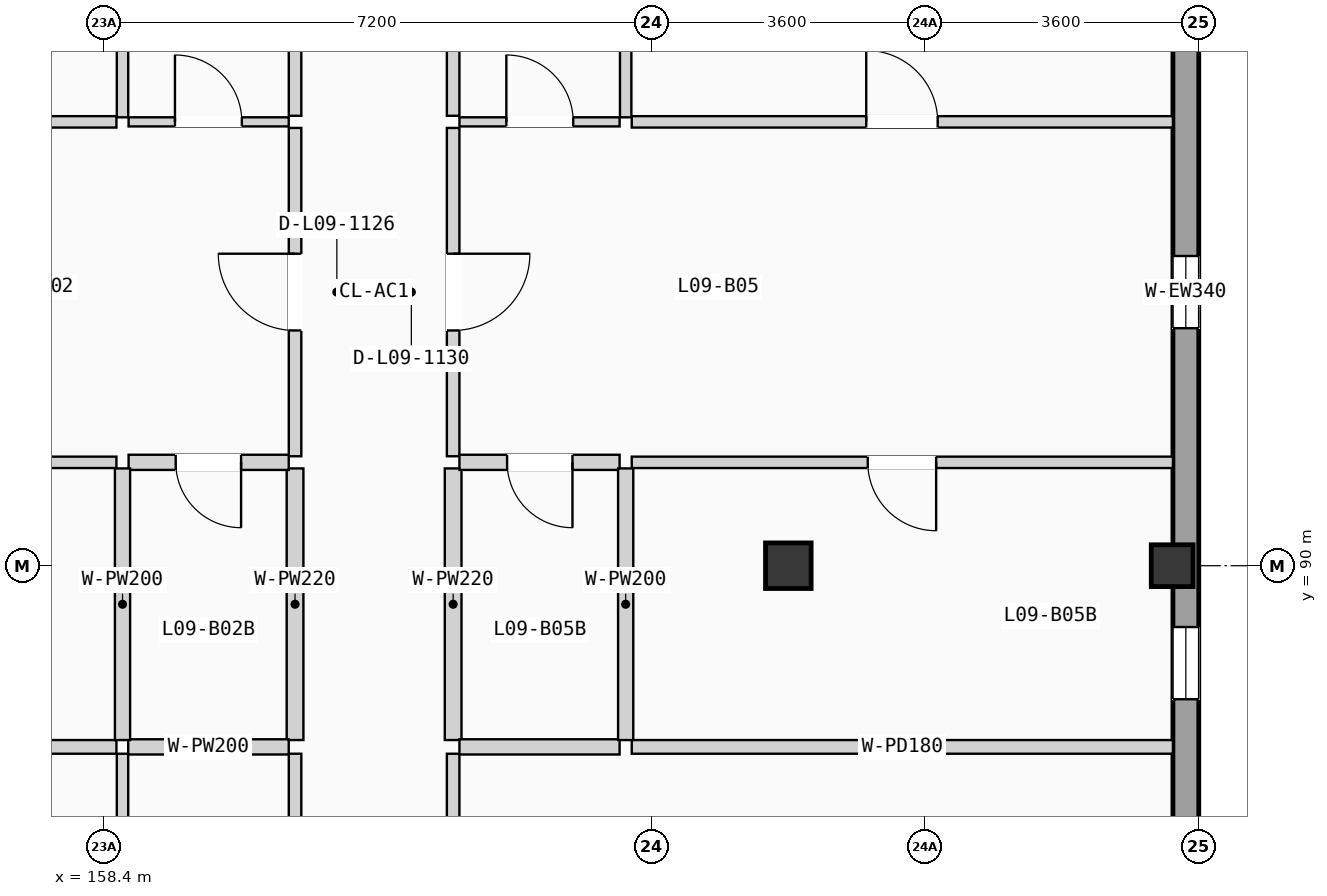
"""IFC4 building model, lengths in metres.
Left out: names, types, materials, properties, quantities, classifications, styles, units other than length and angle.
Written with IfcOpenShell. Run it as: python <this file> out.ifc"""

import sys

from ifc_helpers import new_model, si_unit, direction, frame, frame_2d, origin, origin_2d, place, context, subcontext, project, spatial, rectangle, extrude, element, fill, save


model = new_model("IFC4")
c1 = context("Model", 3, precision=1e-05, world=origin(), true_north=direction((0.0, 1.0)))
c2 = subcontext(c1, "Body", "Model", "MODEL_VIEW")
j1 = project(units=[si_unit("LENGTHUNIT", "METRE"), si_unit("PLANEANGLEUNIT", "RADIAN")], contexts=[c1])
p1 = place(None, origin())
s1 = spatial("IfcSite", under=j1, at=p1, CompositionType="ELEMENT")
p2 = place(p1, origin())
s2 = spatial("IfcBuilding", under=s1, at=p2, CompositionType="ELEMENT")
p3 = place(p2, frame((0.0, 0.0, 30.975)))
s3 = spatial("IfcBuildingStorey", under=s2, at=p3, CompositionType="ELEMENT", Elevation=30.975)
p4 = place(p3, frame((167.4, 90.0, 0.0), z_axis=(0.0, 0.0, 1.0), x_axis=(1.0, 0.0, 0.0)))
e1 = element("IfcColumn", 1, at=p4, inside=s3, PredefinedType="COLUMN", context=c2, shape_type="SweptSolid", body=[
    extrude(rectangle(XDim=0.6, YDim=0.6, at=origin_2d()), origin(), (0.0, 0.0, 1.0), 3.15),
])
p5 = place(p3, frame((172.45, 90.0, 0.0), z_axis=(0.0, 0.0, 1.0), x_axis=(1.0, 0.0, 0.0)))
e2 = element("IfcColumn", 2, at=p5, inside=s3, PredefinedType="COLUMN", context=c2, shape_type="SweptSolid", body=[
    extrude(rectangle(XDim=0.55, YDim=0.55, at=origin_2d()), origin(), (0.0, 0.0, 1.0), 3.15),
])
p6 = place(p3, frame((172.63, 68.74, 0.0), z_axis=(0.0, 0.0, 1.0), x_axis=(0.0, 1.0, 0.0)))
e3 = element("IfcWall", 3, at=p6, inside=s3, PredefinedType="SOLIDWALL", context=c2, shape_type="SweptSolid", body=[
    extrude(rectangle(XDim=49.72, YDim=0.34, at=frame_2d((24.86, 0.0))), origin(), (0.0, 0.0, 1.0), 2.9),
])
p7 = place(p6, frame((9.297, 0.0, 0.715)))
e4 = element("IfcOpeningElement", 4, at=p7, cuts=e3, PredefinedType="OPENING", context=c2, shape_type="SweptSolid", body=[
    extrude(rectangle(XDim=1.6, YDim=1.5, at=frame_2d((0.8, 0.75))), frame((0.0, 0.18, 0.0), z_axis=(0.0, -1.0, 0.0), x_axis=(1.0, 0.0, 0.0)), (0.0, 0.0, 1.0), 0.36),
])
p8 = place(p6, frame((15.758, 0.0, 0.565)))
e5 = element("IfcOpeningElement", 5, at=p8, cuts=e3, PredefinedType="OPENING", context=c2, shape_type="SweptSolid", body=[
    extrude(rectangle(XDim=1.6, YDim=1.65, at=frame_2d((0.8, 0.825))), frame((0.0, 0.18, 0.0), z_axis=(0.0, -1.0, 0.0), x_axis=(1.0, 0.0, 0.0)), (0.0, 0.0, 1.0), 0.36),
])
p9 = place(p6, frame((24.385, 0.0, 0.85)))
e6 = element("IfcOpeningElement", 6, at=p9, cuts=e3, PredefinedType="OPENING", context=c2, shape_type="SweptSolid", body=[
    extrude(rectangle(XDim=0.95, YDim=1.2, at=frame_2d((0.475, 0.6))), frame((0.0, 0.18, 0.0), z_axis=(0.0, -1.0, 0.0), x_axis=(1.0, 0.0, 0.0)), (0.0, 0.0, 1.0), 0.36),
])
p10 = place(p6, frame((19.503, 0.0, 0.85)))
e7 = element("IfcOpeningElement", 7, at=p10, cuts=e3, PredefinedType="OPENING", context=c2, shape_type="SweptSolid", body=[
    extrude(rectangle(XDim=0.95, YDim=1.2, at=frame_2d((0.475, 0.6))), frame((0.0, 0.18, 0.0), z_axis=(0.0, -1.0, 0.0), x_axis=(1.0, 0.0, 0.0)), (0.0, 0.0, 1.0), 0.36),
])
p11 = place(p6, frame((29.267, 0.0, 0.85)))
e8 = element("IfcOpeningElement", 8, at=p11, cuts=e3, PredefinedType="OPENING", context=c2, shape_type="SweptSolid", body=[
    extrude(rectangle(XDim=0.95, YDim=1.2, at=frame_2d((0.475, 0.6))), frame((0.0, 0.18, 0.0), z_axis=(0.0, -1.0, 0.0), x_axis=(1.0, 0.0, 0.0)), (0.0, 0.0, 1.0), 0.36),
])
p12 = place(p6, frame((36.508, 0.0, 0.715)))
e9 = element("IfcOpeningElement", 9, at=p12, cuts=e3, PredefinedType="OPENING", context=c2, shape_type="SweptSolid", body=[
    extrude(rectangle(XDim=1.72, YDim=1.5, at=frame_2d((0.86, 0.75))), frame((0.0, 0.18, 0.0), z_axis=(0.0, -1.0, 0.0), x_axis=(1.0, 0.0, 0.0)), (0.0, 0.0, 1.0), 0.36),
])
p13 = place(p6, frame((31.821, 0.0, 0.565)))
e10 = element("IfcOpeningElement", 10, at=p13, cuts=e3, PredefinedType="OPENING", context=c2, shape_type="SweptSolid", body=[
    extrude(rectangle(XDim=1.72, YDim=1.65, at=frame_2d((0.86, 0.825))), frame((0.0, 0.18, 0.0), z_axis=(0.0, -1.0, 0.0), x_axis=(1.0, 0.0, 0.0)), (0.0, 0.0, 1.0), 0.36),
])
p14 = place(p6, frame((40.239, 0.0, 0.85)))
e11 = element("IfcOpeningElement", 11, at=p14, cuts=e3, PredefinedType="OPENING", context=c2, shape_type="SweptSolid", body=[
    extrude(rectangle(XDim=0.95, YDim=1.2, at=frame_2d((0.475, 0.6))), frame((0.0, 0.18, 0.0), z_axis=(0.0, -1.0, 0.0), x_axis=(1.0, 0.0, 0.0)), (0.0, 0.0, 1.0), 0.36),
])
p15 = place(p3, frame((160.91, 84.033, 0.0), z_axis=(0.0, 0.0, 1.0), x_axis=(0.0, 1.0, 0.0)))
e12 = element("IfcWall", 12, at=p15, inside=s3, PredefinedType="PARTITIONING", context=c2, shape_type="SweptSolid", body=[
    extrude(rectangle(XDim=3.493, YDim=0.165, at=frame_2d((1.747, 0.0))), origin(), (0.0, 0.0, 1.0), 2.87),
])
p16 = place(p3, frame((160.91, 91.44, 0.0), z_axis=(0.0, 0.0, 1.0), x_axis=(0.0, 1.0, 0.0)))
e13 = element("IfcWall", 13, at=p16, inside=s3, PredefinedType="PARTITIONING", context=c2, shape_type="SweptSolid", body=[
    extrude(rectangle(XDim=4.32, YDim=0.165, at=frame_2d((2.16, 0.0))), origin(), (0.0, 0.0, 1.0), 2.87),
])
p17 = place(p16, frame((1.655, 0.0, 0.0)))
e14 = element("IfcOpeningElement", 14, at=p17, cuts=e13, PredefinedType="OPENING", context=c2, shape_type="SweptSolid", body=[
    extrude(rectangle(XDim=1.01, YDim=2.11, at=frame_2d((0.505, 1.055))), frame((0.0, 0.093, 0.0), z_axis=(0.0, -1.0, 0.0), x_axis=(1.0, 0.0, 0.0)), (0.0, 0.0, 1.0), 0.185),
])
p18 = place(p3, frame((160.91, 87.706, 0.0), z_axis=(0.0, 0.0, 1.0), x_axis=(0.0, 1.0, 0.0)))
e15 = element("IfcWall", 15, at=p18, inside=s3, PredefinedType="PLUMBINGWALL", context=c2, shape_type="SweptSolid", body=[
    extrude(rectangle(XDim=3.574, YDim=0.22, at=frame_2d((1.787, 0.0))), origin(), (0.0, 0.0, 1.0), 2.87),
])
p19 = place(p3, frame((160.91, 95.92, 0.0), z_axis=(0.0, 0.0, 1.0), x_axis=(0.0, 1.0, 0.0)))
e16 = element("IfcWall", 16, at=p19, inside=s3, PredefinedType="PARTITIONING", context=c2, shape_type="SweptSolid", body=[
    extrude(rectangle(XDim=3.574, YDim=0.165, at=frame_2d((1.787, 0.0))), origin(), (0.0, 0.0, 1.0), 2.87),
])
p20 = place(p3, frame((162.99, 81.853, 0.0), z_axis=(0.0, 0.0, 1.0), x_axis=(0.0, 1.0, 0.0)))
e17 = element("IfcWall", 17, at=p20, inside=s3, PredefinedType="PARTITIONING", context=c2, shape_type="SweptSolid", body=[
    extrude(rectangle(XDim=5.673, YDim=0.165, at=frame_2d((2.836, 0.0))), origin(), (0.0, 0.0, 1.0), 2.87),
])
p21 = place(p20, frame((2.347, 0.0, 0.0)))
e18 = element("IfcOpeningElement", 18, at=p21, cuts=e17, PredefinedType="OPENING", context=c2, shape_type="SweptSolid", body=[
    extrude(rectangle(XDim=0.98, YDim=2.08, at=frame_2d((0.49, 1.04))), frame((0.0, 0.093, 0.0), z_axis=(0.0, -1.0, 0.0), x_axis=(1.0, 0.0, 0.0)), (0.0, 0.0, 1.0), 0.185),
])
p22 = place(p3, frame((162.99, 91.44, 0.0), z_axis=(0.0, 0.0, 1.0), x_axis=(0.0, 1.0, 0.0)))
e19 = element("IfcWall", 19, at=p22, inside=s3, PredefinedType="PARTITIONING", context=c2, shape_type="SweptSolid", body=[
    extrude(rectangle(XDim=4.32, YDim=0.165, at=frame_2d((2.16, 0.0))), origin(), (0.0, 0.0, 1.0), 2.87),
])
p23 = place(p22, frame((1.655, 0.0, 0.0)))
e20 = element("IfcOpeningElement", 20, at=p23, cuts=e19, PredefinedType="OPENING", context=c2, shape_type="SweptSolid", body=[
    extrude(rectangle(XDim=1.01, YDim=2.11, at=frame_2d((0.505, 1.055))), frame((0.0, 0.093, 0.0), z_axis=(0.0, -1.0, 0.0), x_axis=(1.0, 0.0, 0.0)), (0.0, 0.0, 1.0), 0.185),
])
p24 = place(p3, frame((162.99, 87.706, 0.0), z_axis=(0.0, 0.0, 1.0), x_axis=(0.0, 1.0, 0.0)))
e21 = element("IfcWall", 21, at=p24, inside=s3, PredefinedType="PLUMBINGWALL", context=c2, shape_type="SweptSolid", body=[
    extrude(rectangle(XDim=3.574, YDim=0.22, at=frame_2d((1.787, 0.0))), origin(), (0.0, 0.0, 1.0), 2.87),
])
p25 = place(p3, frame((162.99, 95.92, 0.0), z_axis=(0.0, 0.0, 1.0), x_axis=(0.0, 1.0, 0.0)))
e22 = element("IfcWall", 22, at=p25, inside=s3, PredefinedType="PARTITIONING", context=c2, shape_type="SweptSolid", body=[
    extrude(rectangle(XDim=3.574, YDim=0.165, at=frame_2d((1.787, 0.0))), origin(), (0.0, 0.0, 1.0), 2.87),
])
p26 = place(p3, frame((158.64, 84.013, 0.0), z_axis=(0.0, 0.0, 1.0), x_axis=(0.0, 1.0, 0.0)))
e23 = element("IfcWall", 23, at=p26, inside=s3, PredefinedType="PARTITIONING", context=c2, shape_type="SweptSolid", body=[
    extrude(rectangle(XDim=3.513, YDim=0.15, at=frame_2d((1.756, 0.0))), origin(), (0.0, 0.0, 1.0), 2.87),
])
p27 = place(p3, frame((158.715, 87.616, 0.0), z_axis=(0.0, 0.0, 1.0), x_axis=(1.0, 0.0, 0.0)))
e24 = element("IfcWall", 24, at=p27, inside=s3, PredefinedType="PLUMBINGWALL", context=c2, shape_type="SweptSolid", body=[
    extrude(rectangle(XDim=2.112, YDim=0.2, at=frame_2d((1.056, 0.0))), origin(), (0.0, 0.0, 1.0), 2.87),
])
p28 = place(p3, frame((151.54, 87.616, 0.0), z_axis=(0.0, 0.0, 1.0), x_axis=(1.0, 0.0, 0.0)))
e25 = element("IfcWall", 25, at=p28, inside=s3, PredefinedType="PARTITIONING", context=c2, shape_type="SweptSolid", body=[
    extrude(rectangle(XDim=7.02, YDim=0.18, at=frame_2d((3.51, 0.0))), origin(), (0.0, 0.0, 1.0), 2.87),
])
p29 = place(p3, frame((158.72, 91.36, 0.0), z_axis=(0.0, 0.0, 1.0), x_axis=(1.0, 0.0, 0.0)))
e26 = element("IfcWall", 26, at=p29, inside=s3, PredefinedType="PLUMBINGWALL", context=c2, shape_type="SweptSolid", body=[
    extrude(rectangle(XDim=2.107, YDim=0.2, at=frame_2d((1.053, 0.0))), origin(), (0.0, 0.0, 1.0), 2.87),
])
p30 = place(p29, frame((0.62, 0.0, 0.0)))
e27 = element("IfcOpeningElement", 27, at=p30, cuts=e26, PredefinedType="OPENING", context=c2, shape_type="SweptSolid", body=[
    extrude(rectangle(XDim=0.86, YDim=2.0, at=frame_2d((0.43, 1.0))), frame((0.0, 0.11, 0.0), z_axis=(0.0, -1.0, 0.0), x_axis=(1.0, 0.0, 0.0)), (0.0, 0.0, 1.0), 0.22),
])
p31 = place(p3, frame((158.72, 95.84, 0.0), z_axis=(0.0, 0.0, 1.0), x_axis=(1.0, 0.0, 0.0)))
e28 = element("IfcWall", 28, at=p31, inside=s3, PredefinedType="PARTITIONING", context=c2, shape_type="SweptSolid", body=[
    extrude(rectangle(XDim=2.107, YDim=0.12, at=frame_2d((1.053, 0.0))), origin(), (0.0, 0.0, 1.0), 2.87),
])
p32 = place(p31, frame((0.61, 0.0, 0.0)))
e29 = element("IfcOpeningElement", 29, at=p32, cuts=e28, PredefinedType="OPENING", context=c2, shape_type="SweptSolid", body=[
    extrude(rectangle(XDim=0.88, YDim=2.02, at=frame_2d((0.44, 1.01))), frame((0.0, 0.07, 0.0), z_axis=(0.0, -1.0, 0.0), x_axis=(1.0, 0.0, 0.0)), (0.0, 0.0, 1.0), 0.14),
])
p33 = place(p3, frame((151.54, 91.36, 0.0), z_axis=(0.0, 0.0, 1.0), x_axis=(1.0, 0.0, 0.0)))
e30 = element("IfcWall", 30, at=p33, inside=s3, PredefinedType="PARTITIONING", context=c2, shape_type="SweptSolid", body=[
    extrude(rectangle(XDim=7.02, YDim=0.15, at=frame_2d((3.51, 0.0))), origin(), (0.0, 0.0, 1.0), 2.87),
])
p34 = place(p33, frame((3.045, 0.0, 0.0)))
e31 = element("IfcOpeningElement", 31, at=p34, cuts=e30, PredefinedType="OPENING", context=c2, shape_type="SweptSolid", body=[
    extrude(rectangle(XDim=0.94, YDim=2.06, at=frame_2d((0.47, 1.03))), frame((0.0, 0.085, 0.0), z_axis=(0.0, -1.0, 0.0), x_axis=(1.0, 0.0, 0.0)), (0.0, 0.0, 1.0), 0.17),
])
p35 = place(p3, frame((151.54, 95.84, 0.0), z_axis=(0.0, 0.0, 1.0), x_axis=(1.0, 0.0, 0.0)))
e32 = element("IfcWall", 32, at=p35, inside=s3, PredefinedType="PARTITIONING", context=c2, shape_type="SweptSolid", body=[
    extrude(rectangle(XDim=7.02, YDim=0.15, at=frame_2d((3.51, 0.0))), origin(), (0.0, 0.0, 1.0), 2.87),
])
p36 = place(p35, frame((3.015, 0.0, 0.0)))
e33 = element("IfcOpeningElement", 33, at=p36, cuts=e32, PredefinedType="OPENING", context=c2, shape_type="SweptSolid", body=[
    extrude(rectangle(XDim=1.0, YDim=2.06, at=frame_2d((0.5, 1.03))), frame((0.0, 0.085, 0.0), z_axis=(0.0, -1.0, 0.0), x_axis=(1.0, 0.0, 0.0)), (0.0, 0.0, 1.0), 0.17),
])
p37 = place(p3, frame((158.64, 87.706, 0.0), z_axis=(0.0, 0.0, 1.0), x_axis=(0.0, 1.0, 0.0)))
e34 = element("IfcWall", 34, at=p37, inside=s3, PredefinedType="PLUMBINGWALL", context=c2, shape_type="SweptSolid", body=[
    extrude(rectangle(XDim=3.574, YDim=0.2, at=frame_2d((1.787, 0.0))), origin(), (0.0, 0.0, 1.0), 2.87),
])
p38 = place(p3, frame((158.64, 95.9, 0.0), z_axis=(0.0, 0.0, 1.0), x_axis=(0.0, 1.0, 0.0)))
e35 = element("IfcWall", 35, at=p38, inside=s3, PredefinedType="PARTITIONING", context=c2, shape_type="SweptSolid", body=[
    extrude(rectangle(XDim=3.594, YDim=0.15, at=frame_2d((1.797, 0.0))), origin(), (0.0, 0.0, 1.0), 2.87),
])
p39 = place(p3, frame((163.073, 87.616, 0.0), z_axis=(0.0, 0.0, 1.0), x_axis=(1.0, 0.0, 0.0)))
e36 = element("IfcWall", 36, at=p39, inside=s3, PredefinedType="PLUMBINGWALL", context=c2, shape_type="SweptSolid", body=[
    extrude(rectangle(XDim=2.107, YDim=0.2, at=frame_2d((1.053, 0.0))), origin(), (0.0, 0.0, 1.0), 2.87),
])
p40 = place(p3, frame((165.34, 87.616, 0.0), z_axis=(0.0, 0.0, 1.0), x_axis=(1.0, 0.0, 0.0)))
e37 = element("IfcWall", 37, at=p40, inside=s3, PredefinedType="PARTITIONING", context=c2, shape_type="SweptSolid", body=[
    extrude(rectangle(XDim=7.12, YDim=0.18, at=frame_2d((3.56, 0.0))), origin(), (0.0, 0.0, 1.0), 2.87),
])
p41 = place(p3, frame((163.073, 91.36, 0.0), z_axis=(0.0, 0.0, 1.0), x_axis=(1.0, 0.0, 0.0)))
e38 = element("IfcWall", 38, at=p41, inside=s3, PredefinedType="PLUMBINGWALL", context=c2, shape_type="SweptSolid", body=[
    extrude(rectangle(XDim=2.107, YDim=0.2, at=frame_2d((1.053, 0.0))), origin(), (0.0, 0.0, 1.0), 2.87),
])
p42 = place(p41, frame((0.627, 0.0, 0.0)))
e39 = element("IfcOpeningElement", 39, at=p42, cuts=e38, PredefinedType="OPENING", context=c2, shape_type="SweptSolid", body=[
    extrude(rectangle(XDim=0.86, YDim=2.0, at=frame_2d((0.43, 1.0))), frame((0.0, 0.11, 0.0), z_axis=(0.0, -1.0, 0.0), x_axis=(1.0, 0.0, 0.0)), (0.0, 0.0, 1.0), 0.22),
])
p43 = place(p3, frame((163.073, 95.84, 0.0), z_axis=(0.0, 0.0, 1.0), x_axis=(1.0, 0.0, 0.0)))
e40 = element("IfcWall", 40, at=p43, inside=s3, PredefinedType="PARTITIONING", context=c2, shape_type="SweptSolid", body=[
    extrude(rectangle(XDim=2.107, YDim=0.12, at=frame_2d((1.053, 0.0))), origin(), (0.0, 0.0, 1.0), 2.87),
])
p44 = place(p43, frame((0.617, 0.0, 0.0)))
e41 = element("IfcOpeningElement", 41, at=p44, cuts=e40, PredefinedType="OPENING", context=c2, shape_type="SweptSolid", body=[
    extrude(rectangle(XDim=0.88, YDim=2.02, at=frame_2d((0.44, 1.01))), frame((0.0, 0.07, 0.0), z_axis=(0.0, -1.0, 0.0), x_axis=(1.0, 0.0, 0.0)), (0.0, 0.0, 1.0), 0.14),
])
p45 = place(p3, frame((165.34, 91.36, 0.0), z_axis=(0.0, 0.0, 1.0), x_axis=(1.0, 0.0, 0.0)))
e42 = element("IfcWall", 42, at=p45, inside=s3, PredefinedType="PARTITIONING", context=c2, shape_type="SweptSolid", body=[
    extrude(rectangle(XDim=7.12, YDim=0.15, at=frame_2d((3.56, 0.0))), origin(), (0.0, 0.0, 1.0), 2.87),
])
p46 = place(p45, frame((3.105, 0.0, 0.0)))
e43 = element("IfcOpeningElement", 43, at=p46, cuts=e42, PredefinedType="OPENING", context=c2, shape_type="SweptSolid", body=[
    extrude(rectangle(XDim=0.9, YDim=2.04, at=frame_2d((0.45, 1.02))), frame((0.0, 0.085, 0.0), z_axis=(0.0, -1.0, 0.0), x_axis=(1.0, 0.0, 0.0)), (0.0, 0.0, 1.0), 0.17),
])
p47 = place(p3, frame((165.34, 95.84, 0.0), z_axis=(0.0, 0.0, 1.0), x_axis=(1.0, 0.0, 0.0)))
e44 = element("IfcWall", 44, at=p47, inside=s3, PredefinedType="PARTITIONING", context=c2, shape_type="SweptSolid", body=[
    extrude(rectangle(XDim=7.12, YDim=0.15, at=frame_2d((3.56, 0.0))), origin(), (0.0, 0.0, 1.0), 2.87),
])
p48 = place(p47, frame((3.085, 0.0, 0.0)))
e45 = element("IfcOpeningElement", 45, at=p48, cuts=e44, PredefinedType="OPENING", context=c2, shape_type="SweptSolid", body=[
    extrude(rectangle(XDim=0.94, YDim=2.06, at=frame_2d((0.47, 1.03))), frame((0.0, 0.085, 0.0), z_axis=(0.0, -1.0, 0.0), x_axis=(1.0, 0.0, 0.0)), (0.0, 0.0, 1.0), 0.17),
])
p49 = place(p3, frame((165.26, 87.706, 0.0), z_axis=(0.0, 0.0, 1.0), x_axis=(0.0, 1.0, 0.0)))
e46 = element("IfcWall", 46, at=p49, inside=s3, PredefinedType="PLUMBINGWALL", context=c2, shape_type="SweptSolid", body=[
    extrude(rectangle(XDim=3.574, YDim=0.2, at=frame_2d((1.787, 0.0))), origin(), (0.0, 0.0, 1.0), 2.87),
])
p50 = place(p3, frame((165.26, 95.9, 0.0), z_axis=(0.0, 0.0, 1.0), x_axis=(0.0, 1.0, 0.0)))
e47 = element("IfcWall", 47, at=p50, inside=s3, PredefinedType="PARTITIONING", context=c2, shape_type="SweptSolid", body=[
    extrude(rectangle(XDim=3.594, YDim=0.15, at=frame_2d((1.797, 0.0))), origin(), (0.0, 0.0, 1.0), 2.87),
])
p51 = place(p9, origin())
e48 = element("IfcWindow", 48, at=p51, inside=s3, PartitioningType="SINGLE_PANEL", PredefinedType="WINDOW", context=c2, shape_type="SweptSolid", body=[
    extrude(rectangle(XDim=0.95, YDim=1.2, at=frame_2d((0.475, 0.6))), frame((0.0, 0.03, 0.0), z_axis=(0.0, -1.0, 0.0), x_axis=(1.0, 0.0, 0.0)), (0.0, 0.0, 1.0), 0.06),
])
fill(e6, e48)
p52 = place(p10, origin())
e49 = element("IfcWindow", 49, at=p52, inside=s3, PartitioningType="SINGLE_PANEL", PredefinedType="WINDOW", context=c2, shape_type="SweptSolid", body=[
    extrude(rectangle(XDim=0.95, YDim=1.2, at=frame_2d((0.475, 0.6))), frame((0.0, 0.03, 0.0), z_axis=(0.0, -1.0, 0.0), x_axis=(1.0, 0.0, 0.0)), (0.0, 0.0, 1.0), 0.06),
])
fill(e7, e49)
p53 = place(p17, origin())
e50 = element("IfcDoor", 50, at=p53, inside=s3, OperationType="SINGLE_SWING_RIGHT", PredefinedType="DOOR", context=c2, shape_type="SweptSolid", body=[
    extrude(rectangle(XDim=1.01, YDim=2.11, at=frame_2d((0.505, 1.055))), frame((0.0, 0.025, 0.0), z_axis=(0.0, -1.0, 0.0), x_axis=(1.0, 0.0, 0.0)), (0.0, 0.0, 1.0), 0.05),
])
fill(e14, e50)
p54 = place(p23, frame((1.01, 0.0, 0.0), z_axis=(0.0, 0.0, 1.0), x_axis=(-1.0, 0.0, 0.0)))
e51 = element("IfcDoor", 51, at=p54, inside=s3, OperationType="SINGLE_SWING_RIGHT", PredefinedType="DOOR", context=c2, shape_type="SweptSolid", body=[
    extrude(rectangle(XDim=1.01, YDim=2.11, at=frame_2d((0.505, 1.055))), frame((0.0, 0.025, 0.0), z_axis=(0.0, -1.0, 0.0), x_axis=(1.0, 0.0, 0.0)), (0.0, 0.0, 1.0), 0.05),
])
fill(e20, e51)
p55 = place(p30, frame((0.86, 0.0, 0.0), z_axis=(0.0, 0.0, 1.0), x_axis=(-1.0, 0.0, 0.0)))
e52 = element("IfcDoor", 52, at=p55, inside=s3, OperationType="SINGLE_SWING_RIGHT", PredefinedType="DOOR", context=c2, shape_type="SweptSolid", body=[
    extrude(rectangle(XDim=0.86, YDim=2.0, at=frame_2d((0.43, 1.0))), frame((0.0, 0.025, 0.0), z_axis=(0.0, -1.0, 0.0), x_axis=(1.0, 0.0, 0.0)), (0.0, 0.0, 1.0), 0.05),
])
fill(e27, e52)
p56 = place(p32, origin())
e53 = element("IfcDoor", 53, at=p56, inside=s3, OperationType="SINGLE_SWING_LEFT", PredefinedType="DOOR", context=c2, shape_type="SweptSolid", body=[
    extrude(rectangle(XDim=0.88, YDim=2.02, at=frame_2d((0.44, 1.01))), frame((0.0, 0.025, 0.0), z_axis=(0.0, -1.0, 0.0), x_axis=(1.0, 0.0, 0.0)), (0.0, 0.0, 1.0), 0.05),
])
fill(e29, e53)
p57 = place(p42, frame((0.86, 0.0, 0.0), z_axis=(0.0, 0.0, 1.0), x_axis=(-1.0, 0.0, 0.0)))
e54 = element("IfcDoor", 54, at=p57, inside=s3, OperationType="SINGLE_SWING_RIGHT", PredefinedType="DOOR", context=c2, shape_type="SweptSolid", body=[
    extrude(rectangle(XDim=0.86, YDim=2.0, at=frame_2d((0.43, 1.0))), frame((0.0, 0.025, 0.0), z_axis=(0.0, -1.0, 0.0), x_axis=(1.0, 0.0, 0.0)), (0.0, 0.0, 1.0), 0.05),
])
fill(e39, e54)
p58 = place(p44, origin())
e55 = element("IfcDoor", 55, at=p58, inside=s3, OperationType="SINGLE_SWING_LEFT", PredefinedType="DOOR", context=c2, shape_type="SweptSolid", body=[
    extrude(rectangle(XDim=0.88, YDim=2.02, at=frame_2d((0.44, 1.01))), frame((0.0, 0.025, 0.0), z_axis=(0.0, -1.0, 0.0), x_axis=(1.0, 0.0, 0.0)), (0.0, 0.0, 1.0), 0.05),
])
fill(e41, e55)
p59 = place(p46, frame((0.9, 0.0, 0.0), z_axis=(0.0, 0.0, 1.0), x_axis=(-1.0, 0.0, 0.0)))
e56 = element("IfcDoor", 56, at=p59, inside=s3, OperationType="SINGLE_SWING_RIGHT", PredefinedType="DOOR", context=c2, shape_type="SweptSolid", body=[
    extrude(rectangle(XDim=0.9, YDim=2.04, at=frame_2d((0.45, 1.02))), frame((0.0, 0.025, 0.0), z_axis=(0.0, -1.0, 0.0), x_axis=(1.0, 0.0, 0.0)), (0.0, 0.0, 1.0), 0.05),
])
fill(e43, e56)
p60 = place(p48, origin())
e57 = element("IfcDoor", 57, at=p60, inside=s3, OperationType="SINGLE_SWING_LEFT", PredefinedType="DOOR", context=c2, shape_type="SweptSolid", body=[
    extrude(rectangle(XDim=0.94, YDim=2.06, at=frame_2d((0.47, 1.03))), frame((0.0, 0.025, 0.0), z_axis=(0.0, -1.0, 0.0), x_axis=(1.0, 0.0, 0.0)), (0.0, 0.0, 1.0), 0.05),
])
fill(e45, e57)
save(model, sys.argv[1])
